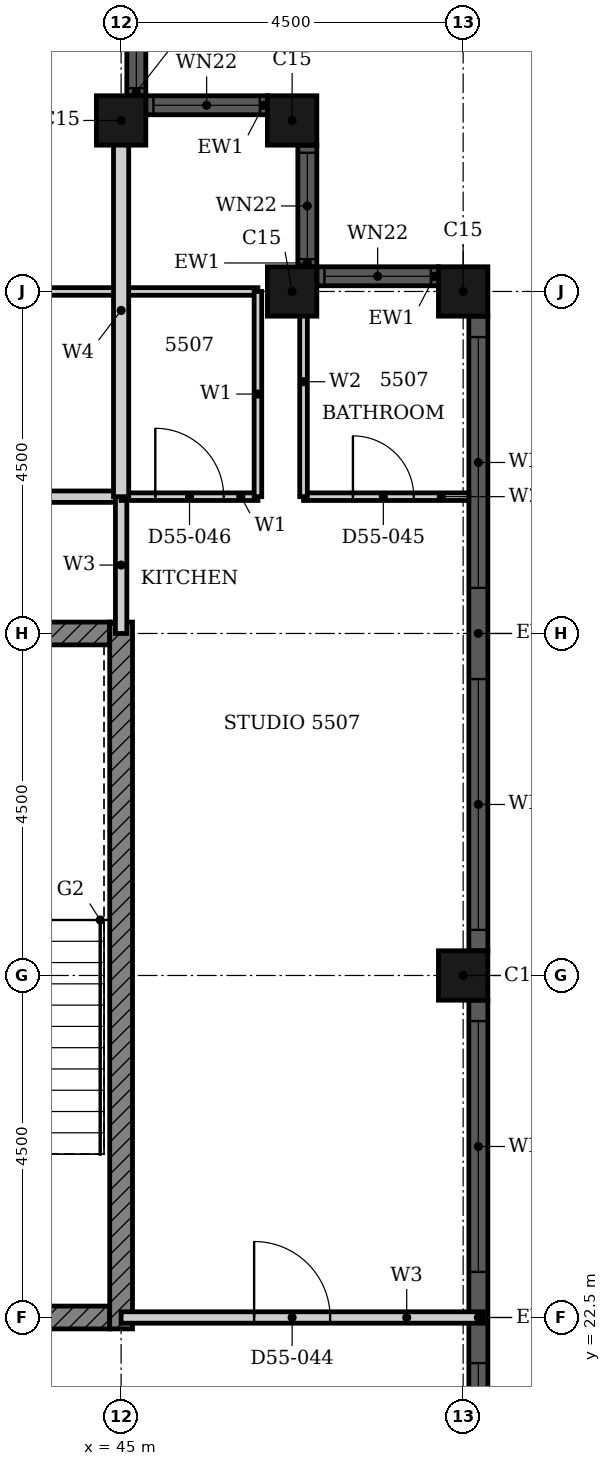
"""IFC4 building model, lengths in metres.
Left out: names, types, materials, properties, quantities, classifications, styles, units other than length and angle.
Written with IfcOpenShell. Run it as: python <this file> out.ifc"""

import sys

from ifc_helpers import new_model, si_unit, direction, frame, frame_2d, origin, origin_2d, place, context, subcontext, project, spatial, rectangle, hollow_rectangle, extrude, element, fill, save


model = new_model("IFC4")
c1 = context("Model", 3, precision=1e-05, world=origin(), true_north=direction((0.0, 1.0)))
c2 = subcontext(c1, "Body", "Model", "MODEL_VIEW")
j1 = project(units=[si_unit("LENGTHUNIT", "METRE"), si_unit("PLANEANGLEUNIT", "RADIAN")], contexts=[c1])
p1 = place(None, origin())
s1 = spatial("IfcSite", under=j1, at=p1, CompositionType="ELEMENT")
p2 = place(p1, origin())
s2 = spatial("IfcBuilding", under=s1, at=p2, CompositionType="ELEMENT")
p3 = place(p2, frame((0.0, 0.0, 218.3)))
s3 = spatial("IfcBuildingStorey", under=s2, at=p3, CompositionType="ELEMENT", Elevation=218.3)
for number, where, z_axis, x_axis in (
    (1, (49.5, 27.0, 0.0), (0.0, 0.0, 1.0), (1.0, 0.0, 0.0)),
    (2, (49.5, 36.0, 0.0), (0.0, 0.0, 1.0), (1.0, 0.0, 0.0)),
    (3, (47.25, 36.0, 0.0), (0.0, 0.0, 1.0), (1.0, 0.0, 0.0)),
    (4, (47.25, 38.25, 0.0), (0.0, 0.0, 1.0), (1.0, 0.0, 0.0)),
    (5, (45.0, 38.25, 0.0), (0.0, 0.0, 1.0), (1.0, 0.0, 0.0)),
):
    element("IfcColumn", number, at=place(p3, frame(where, z_axis=z_axis, x_axis=x_axis)), inside=s3, PredefinedType="COLUMN", context=c2, shape_type="SweptSolid", body=[
        extrude(hollow_rectangle(XDim=0.65, YDim=0.65, WallThickness=0.021, at=origin_2d()), origin(), (0.0, 0.0, 1.0), 3.7),
    ])
p4 = place(p3, frame((49.7, 18.325, 0.0), z_axis=(0.0, 0.0, 1.0), x_axis=(0.0, 1.0, 0.0)))
e6 = element("IfcWall", 6, at=p4, inside=s3, PredefinedType="SOLIDWALL", context=c2, shape_type="SweptSolid", body=[
    extrude(rectangle(XDim=8.35, YDim=0.25, at=frame_2d((4.175, 0.0))), origin(), (0.0, 0.0, 1.0), 3.7),
])
p5 = place(p4, frame((0.275, 0.0, 0.45)))
e7 = element("IfcOpeningElement", 7, at=p5, cuts=e6, PredefinedType="OPENING", context=c2, shape_type="SweptSolid", body=[
    extrude(rectangle(XDim=3.3, YDim=2.3, at=frame_2d((1.65, 1.15))), frame((0.0, 0.135, 0.0), z_axis=(0.0, -1.0, 0.0), x_axis=(1.0, 0.0, 0.0)), (0.0, 0.0, 1.0), 0.27),
])
p6 = place(p4, frame((4.775, 0.0, 0.45)))
e8 = element("IfcOpeningElement", 8, at=p6, cuts=e6, PredefinedType="OPENING", context=c2, shape_type="SweptSolid", body=[
    extrude(rectangle(XDim=3.3, YDim=2.3, at=frame_2d((1.65, 1.15))), frame((0.0, 0.135, 0.0), z_axis=(0.0, -1.0, 0.0), x_axis=(1.0, 0.0, 0.0)), (0.0, 0.0, 1.0), 0.27),
])
p7 = place(p3, frame((49.7, 27.325, 0.0), z_axis=(0.0, 0.0, 1.0), x_axis=(0.0, 1.0, 0.0)))
e9 = element("IfcWall", 9, at=p7, inside=s3, PredefinedType="SOLIDWALL", context=c2, shape_type="SweptSolid", body=[
    extrude(rectangle(XDim=8.35, YDim=0.25, at=frame_2d((4.175, 0.0))), origin(), (0.0, 0.0, 1.0), 3.7),
])
p8 = place(p7, frame((0.275, 0.0, 0.45)))
e10 = element("IfcOpeningElement", 10, at=p8, cuts=e9, PredefinedType="OPENING", context=c2, shape_type="SweptSolid", body=[
    extrude(rectangle(XDim=3.3, YDim=2.3, at=frame_2d((1.65, 1.15))), frame((0.0, 0.135, 0.0), z_axis=(0.0, -1.0, 0.0), x_axis=(1.0, 0.0, 0.0)), (0.0, 0.0, 1.0), 0.27),
])
p9 = place(p7, frame((4.775, 0.0, 0.45)))
e11 = element("IfcOpeningElement", 11, at=p9, cuts=e9, PredefinedType="OPENING", context=c2, shape_type="SweptSolid", body=[
    extrude(rectangle(XDim=3.3, YDim=2.3, at=frame_2d((1.65, 1.15))), frame((0.0, 0.135, 0.0), z_axis=(0.0, -1.0, 0.0), x_axis=(1.0, 0.0, 0.0)), (0.0, 0.0, 1.0), 0.27),
])
p10 = place(p3, frame((49.175, 36.2, 0.0), z_axis=(0.0, 0.0, 1.0), x_axis=(-1.0, 0.0, 0.0)))
e12 = element("IfcWall", 12, at=p10, inside=s3, PredefinedType="SOLIDWALL", context=c2, shape_type="SweptSolid", body=[
    extrude(rectangle(XDim=1.6, YDim=0.25, at=frame_2d((0.8, 0.0))), origin(), (0.0, 0.0, 1.0), 3.7),
])
p11 = place(p10, frame((0.1, 0.0, 0.9)))
e13 = element("IfcOpeningElement", 13, at=p11, cuts=e12, PredefinedType="OPENING", context=c2, shape_type="SweptSolid", body=[
    extrude(rectangle(XDim=1.4, YDim=1.85, at=frame_2d((0.7, 0.925))), frame((0.0, 0.135, 0.0), z_axis=(0.0, -1.0, 0.0), x_axis=(1.0, 0.0, 0.0)), (0.0, 0.0, 1.0), 0.27),
])
p12 = place(p3, frame((47.45, 36.325, 0.0), z_axis=(0.0, 0.0, 1.0), x_axis=(0.0, 1.0, 0.0)))
e14 = element("IfcWall", 14, at=p12, inside=s3, PredefinedType="SOLIDWALL", context=c2, shape_type="SweptSolid", body=[
    extrude(rectangle(XDim=1.6, YDim=0.25, at=frame_2d((0.8, 0.0))), origin(), (0.0, 0.0, 1.0), 3.7),
])
p13 = place(p12, frame((0.1, 0.0, 0.9)))
e15 = element("IfcOpeningElement", 15, at=p13, cuts=e14, PredefinedType="OPENING", context=c2, shape_type="SweptSolid", body=[
    extrude(rectangle(XDim=1.4, YDim=1.85, at=frame_2d((0.7, 0.925))), frame((0.0, 0.135, 0.0), z_axis=(0.0, -1.0, 0.0), x_axis=(1.0, 0.0, 0.0)), (0.0, 0.0, 1.0), 0.27),
])
p14 = place(p3, frame((46.925, 38.45, 0.0), z_axis=(0.0, 0.0, 1.0), x_axis=(-1.0, 0.0, 0.0)))
e16 = element("IfcWall", 16, at=p14, inside=s3, PredefinedType="SOLIDWALL", context=c2, shape_type="SweptSolid", body=[
    extrude(rectangle(XDim=1.6, YDim=0.25, at=frame_2d((0.8, 0.0))), origin(), (0.0, 0.0, 1.0), 3.7),
])
p15 = place(p14, frame((0.1, 0.0, 0.9)))
e17 = element("IfcOpeningElement", 17, at=p15, cuts=e16, PredefinedType="OPENING", context=c2, shape_type="SweptSolid", body=[
    extrude(rectangle(XDim=1.4, YDim=1.85, at=frame_2d((0.7, 0.925))), frame((0.0, 0.135, 0.0), z_axis=(0.0, -1.0, 0.0), x_axis=(1.0, 0.0, 0.0)), (0.0, 0.0, 1.0), 0.27),
])
p16 = place(p3, frame((45.2, 38.575, 0.0), z_axis=(0.0, 0.0, 1.0), x_axis=(0.0, 1.0, 0.0)))
e18 = element("IfcWall", 18, at=p16, inside=s3, PredefinedType="SOLIDWALL", context=c2, shape_type="SweptSolid", body=[
    extrude(rectangle(XDim=1.6, YDim=0.25, at=frame_2d((0.8, 0.0))), origin(), (0.0, 0.0, 1.0), 3.7),
])
p17 = place(p16, frame((0.1, 0.0, 0.9)))
e19 = element("IfcOpeningElement", 19, at=p17, cuts=e18, PredefinedType="OPENING", context=c2, shape_type="SweptSolid", body=[
    extrude(rectangle(XDim=1.4, YDim=1.85, at=frame_2d((0.7, 0.925))), frame((0.0, 0.135, 0.0), z_axis=(0.0, -1.0, 0.0), x_axis=(1.0, 0.0, 0.0)), (0.0, 0.0, 1.0), 0.27),
])
p18 = place(p3, frame((32.911, 22.5, 0.0), z_axis=(0.0, 0.0, 1.0), x_axis=(1.0, 0.0, 0.0)))
e20 = element("IfcWall", 20, at=p18, inside=s3, PredefinedType="SHEAR", context=c2, shape_type="SweptSolid", body=[
    extrude(rectangle(XDim=11.939, YDim=0.3, at=frame_2d((5.97, 0.0))), origin(), (0.0, 0.0, 1.0), 3.4),
])
p19 = place(p18, frame((5.404, 0.0, 0.0)))
e21 = element("IfcOpeningElement", 21, at=p19, cuts=e20, PredefinedType="OPENING", context=c2, shape_type="SweptSolid", body=[
    extrude(rectangle(XDim=1.8, YDim=2.1, at=frame_2d((0.9, 1.05))), frame((0.0, 0.16, 0.0), z_axis=(0.0, -1.0, 0.0), x_axis=(1.0, 0.0, 0.0)), (0.0, 0.0, 1.0), 0.32),
])
p20 = place(p3, frame((40.625, 31.5, 0.0), z_axis=(0.0, 0.0, 1.0), x_axis=(1.0, 0.0, 0.0)))
e22 = element("IfcWall", 22, at=p20, inside=s3, PredefinedType="SHEAR", context=c2, shape_type="SweptSolid", body=[
    extrude(rectangle(XDim=4.225, YDim=0.3, at=frame_2d((2.113, 0.0))), origin(), (0.0, 0.0, 1.0), 3.4),
])
p21 = place(p3, frame((45.0, 22.35, 0.0), z_axis=(0.0, 0.0, 1.0), x_axis=(0.0, 1.0, 0.0)))
e23 = element("IfcWall", 23, at=p21, inside=s3, PredefinedType="SHEAR", context=c2, shape_type="SweptSolid", body=[
    extrude(rectangle(XDim=9.3, YDim=0.3, at=frame_2d((4.65, 0.0))), origin(), (0.0, 0.0, 1.0), 3.4),
])
p22 = place(p3, frame((45.0, 22.5, 0.0), z_axis=(0.0, 0.0, 1.0), x_axis=(1.0, 0.0, 0.0)))
e24 = element("IfcWall", 24, at=p22, inside=s3, PredefinedType="PARTITIONING", context=c2, shape_type="SweptSolid", body=[
    extrude(rectangle(XDim=4.765, YDim=0.15, at=frame_2d((2.382, 0.0))), origin(), (0.0, 0.0, 1.0), 3.4),
])
p23 = place(p22, frame((1.75, 0.0, 0.0)))
e25 = element("IfcOpeningElement", 25, at=p23, cuts=e24, PredefinedType="OPENING", context=c2, shape_type="SweptSolid", body=[
    extrude(rectangle(XDim=1.0, YDim=2.2, at=frame_2d((0.5, 1.1))), frame((0.0, 0.085, 0.0), z_axis=(0.0, -1.0, 0.0), x_axis=(1.0, 0.0, 0.0)), (0.0, 0.0, 1.0), 0.17),
])
p24 = place(p3, frame((33.9, 33.3, 0.0), z_axis=(0.0, 0.0, 1.0), x_axis=(1.0, 0.0, 0.0)))
e26 = element("IfcWall", 26, at=p24, inside=s3, PredefinedType="PARTITIONING", context=c2, shape_type="SweptSolid", body=[
    extrude(rectangle(XDim=11.1, YDim=0.15, at=frame_2d((5.55, 0.0))), origin(), (0.0, 0.0, 1.0), 3.4),
])
p25 = place(p24, frame((1.6, 0.0, 0.0)))
e27 = element("IfcOpeningElement", 27, at=p25, cuts=e26, PredefinedType="OPENING", context=c2, shape_type="SweptSolid", body=[
    extrude(rectangle(XDim=1.0, YDim=2.2, at=frame_2d((0.5, 1.1))), frame((0.0, 0.085, 0.0), z_axis=(0.0, -1.0, 0.0), x_axis=(1.0, 0.0, 0.0)), (0.0, 0.0, 1.0), 0.17),
])
p26 = place(p3, frame((45.0, 31.5, 0.0), z_axis=(0.0, 0.0, 1.0), x_axis=(0.0, 1.0, 0.0)))
e28 = element("IfcWall", 28, at=p26, inside=s3, PredefinedType="PARTITIONING", context=c2, shape_type="SweptSolid", body=[
    extrude(rectangle(XDim=1.8, YDim=0.15, at=frame_2d((0.9, 0.0))), origin(), (0.0, 0.0, 1.0), 3.4),
])
p27 = place(p3, frame((45.0, 33.3, 0.0), z_axis=(0.0, 0.0, 1.0), x_axis=(1.0, 0.0, 0.0)))
e29 = element("IfcWall", 29, at=p27, inside=s3, PredefinedType="PARTITIONING", context=c2, shape_type="SweptSolid", body=[
    extrude(rectangle(XDim=1.8, YDim=0.1, at=frame_2d((0.9, 0.0))), origin(), (0.0, 0.0, 1.0), 3.4),
])
p28 = place(p27, frame((0.45, 0.0, 0.0)))
e30 = element("IfcOpeningElement", 30, at=p28, cuts=e29, PredefinedType="OPENING", context=c2, shape_type="SweptSolid", body=[
    extrude(rectangle(XDim=0.9, YDim=2.1, at=frame_2d((0.45, 1.05))), frame((0.0, 0.06, 0.0), z_axis=(0.0, -1.0, 0.0), x_axis=(1.0, 0.0, 0.0)), (0.0, 0.0, 1.0), 0.12),
])
p29 = place(p3, frame((38.1, 36.0, 0.0), z_axis=(0.0, 0.0, 1.0), x_axis=(1.0, 0.0, 0.0)))
e31 = element("IfcWall", 31, at=p29, inside=s3, PredefinedType="PARTITIONING", context=c2, shape_type="SweptSolid", body=[
    extrude(rectangle(XDim=8.7, YDim=0.1, at=frame_2d((4.35, 0.0))), origin(), (0.0, 0.0, 1.0), 3.4),
])
p30 = place(p29, frame((4.65, 0.0, 0.0)))
e32 = element("IfcOpeningElement", 32, at=p30, cuts=e31, PredefinedType="OPENING", context=c2, shape_type="SweptSolid", body=[
    extrude(rectangle(XDim=0.9, YDim=2.1, at=frame_2d((0.45, 1.05))), frame((0.0, 0.06, 0.0), z_axis=(0.0, -1.0, 0.0), x_axis=(1.0, 0.0, 0.0)), (0.0, 0.0, 1.0), 0.12),
])
p31 = place(p3, frame((46.8, 33.3, 0.0), z_axis=(0.0, 0.0, 1.0), x_axis=(0.0, 1.0, 0.0)))
e33 = element("IfcWall", 33, at=p31, inside=s3, PredefinedType="PARTITIONING", context=c2, shape_type="SweptSolid", body=[
    extrude(rectangle(XDim=2.7, YDim=0.1, at=frame_2d((1.35, 0.0))), origin(), (0.0, 0.0, 1.0), 3.4),
])
p32 = place(p3, frame((45.0, 33.3, 0.0), z_axis=(0.0, 0.0, 1.0), x_axis=(0.0, 1.0, 0.0)))
e34 = element("IfcWall", 34, at=p32, inside=s3, PredefinedType="PARTITIONING", context=c2, shape_type="SweptSolid", body=[
    extrude(rectangle(XDim=4.9, YDim=0.2, at=frame_2d((2.45, 0.0))), origin(), (0.0, 0.0, 1.0), 3.4),
])
p33 = place(p3, frame((47.4, 33.3, 0.0), z_axis=(0.0, 0.0, 1.0), x_axis=(1.0, 0.0, 0.0)))
e35 = element("IfcWall", 35, at=p33, inside=s3, PredefinedType="PARTITIONING", context=c2, shape_type="SweptSolid", body=[
    extrude(rectangle(XDim=2.175, YDim=0.1, at=frame_2d((1.087, 0.0))), origin(), (0.0, 0.0, 1.0), 3.4),
])
p34 = place(p33, frame((0.65, 0.0, 0.0)))
e36 = element("IfcOpeningElement", 36, at=p34, cuts=e35, PredefinedType="OPENING", context=c2, shape_type="SweptSolid", body=[
    extrude(rectangle(XDim=0.8, YDim=2.1, at=frame_2d((0.4, 1.05))), frame((0.0, 0.06, 0.0), z_axis=(0.0, -1.0, 0.0), x_axis=(1.0, 0.0, 0.0)), (0.0, 0.0, 1.0), 0.12),
])
p35 = place(p3, frame((47.4, 33.3, 0.0), z_axis=(0.0, 0.0, 1.0), x_axis=(0.0, 1.0, 0.0)))
e37 = element("IfcWall", 37, at=p35, inside=s3, PredefinedType="PARTITIONING", context=c2, shape_type="SweptSolid", body=[
    extrude(rectangle(XDim=3.025, YDim=0.1, at=frame_2d((1.512, 0.0))), origin(), (0.0, 0.0, 1.0), 3.4),
])
p36 = place(p5, origin())
e38 = element("IfcWindow", 38, at=p36, inside=s3, PartitioningType="SINGLE_PANEL", PredefinedType="WINDOW", context=c2, shape_type="SweptSolid", body=[
    extrude(rectangle(XDim=3.3, YDim=2.3, at=frame_2d((1.65, 1.15))), frame((0.0, 0.03, 0.0), z_axis=(0.0, -1.0, 0.0), x_axis=(1.0, 0.0, 0.0)), (0.0, 0.0, 1.0), 0.06),
])
fill(e7, e38)
p37 = place(p6, origin())
e39 = element("IfcWindow", 39, at=p37, inside=s3, PartitioningType="SINGLE_PANEL", PredefinedType="WINDOW", context=c2, shape_type="SweptSolid", body=[
    extrude(rectangle(XDim=3.3, YDim=2.3, at=frame_2d((1.65, 1.15))), frame((0.0, 0.03, 0.0), z_axis=(0.0, -1.0, 0.0), x_axis=(1.0, 0.0, 0.0)), (0.0, 0.0, 1.0), 0.06),
])
fill(e8, e39)
p38 = place(p8, origin())
e40 = element("IfcWindow", 40, at=p38, inside=s3, PartitioningType="SINGLE_PANEL", PredefinedType="WINDOW", context=c2, shape_type="SweptSolid", body=[
    extrude(rectangle(XDim=3.3, YDim=2.3, at=frame_2d((1.65, 1.15))), frame((0.0, 0.03, 0.0), z_axis=(0.0, -1.0, 0.0), x_axis=(1.0, 0.0, 0.0)), (0.0, 0.0, 1.0), 0.06),
])
fill(e10, e40)
p39 = place(p9, origin())
e41 = element("IfcWindow", 41, at=p39, inside=s3, PartitioningType="SINGLE_PANEL", PredefinedType="WINDOW", context=c2, shape_type="SweptSolid", body=[
    extrude(rectangle(XDim=3.3, YDim=2.3, at=frame_2d((1.65, 1.15))), frame((0.0, 0.03, 0.0), z_axis=(0.0, -1.0, 0.0), x_axis=(1.0, 0.0, 0.0)), (0.0, 0.0, 1.0), 0.06),
])
fill(e11, e41)
p40 = place(p11, origin())
e42 = element("IfcWindow", 42, at=p40, inside=s3, PartitioningType="SINGLE_PANEL", PredefinedType="WINDOW", context=c2, shape_type="SweptSolid", body=[
    extrude(rectangle(XDim=1.4, YDim=1.85, at=frame_2d((0.7, 0.925))), frame((0.0, 0.03, 0.0), z_axis=(0.0, -1.0, 0.0), x_axis=(1.0, 0.0, 0.0)), (0.0, 0.0, 1.0), 0.06),
])
fill(e13, e42)
p41 = place(p13, origin())
e43 = element("IfcWindow", 43, at=p41, inside=s3, PartitioningType="SINGLE_PANEL", PredefinedType="WINDOW", context=c2, shape_type="SweptSolid", body=[
    extrude(rectangle(XDim=1.4, YDim=1.85, at=frame_2d((0.7, 0.925))), frame((0.0, 0.03, 0.0), z_axis=(0.0, -1.0, 0.0), x_axis=(1.0, 0.0, 0.0)), (0.0, 0.0, 1.0), 0.06),
])
fill(e15, e43)
p42 = place(p15, origin())
e44 = element("IfcWindow", 44, at=p42, inside=s3, PartitioningType="SINGLE_PANEL", PredefinedType="WINDOW", context=c2, shape_type="SweptSolid", body=[
    extrude(rectangle(XDim=1.4, YDim=1.85, at=frame_2d((0.7, 0.925))), frame((0.0, 0.03, 0.0), z_axis=(0.0, -1.0, 0.0), x_axis=(1.0, 0.0, 0.0)), (0.0, 0.0, 1.0), 0.06),
])
fill(e17, e44)
p43 = place(p17, origin())
e45 = element("IfcWindow", 45, at=p43, inside=s3, PartitioningType="SINGLE_PANEL", PredefinedType="WINDOW", context=c2, shape_type="SweptSolid", body=[
    extrude(rectangle(XDim=1.4, YDim=1.85, at=frame_2d((0.7, 0.925))), frame((0.0, 0.03, 0.0), z_axis=(0.0, -1.0, 0.0), x_axis=(1.0, 0.0, 0.0)), (0.0, 0.0, 1.0), 0.06),
])
fill(e19, e45)
p44 = place(p23, origin())
e46 = element("IfcDoor", 46, at=p44, inside=s3, OperationType="SINGLE_SWING_LEFT", PredefinedType="DOOR", context=c2, shape_type="SweptSolid", body=[
    extrude(rectangle(XDim=1.0, YDim=2.2, at=frame_2d((0.5, 1.1))), frame((0.0, 0.025, 0.0), z_axis=(0.0, -1.0, 0.0), x_axis=(1.0, 0.0, 0.0)), (0.0, 0.0, 1.0), 0.05),
])
fill(e25, e46)
p45 = place(p34, origin())
e47 = element("IfcDoor", 47, at=p45, inside=s3, OperationType="SINGLE_SWING_LEFT", PredefinedType="DOOR", context=c2, shape_type="SweptSolid", body=[
    extrude(rectangle(XDim=0.8, YDim=2.1, at=frame_2d((0.4, 1.05))), frame((0.0, 0.025, 0.0), z_axis=(0.0, -1.0, 0.0), x_axis=(1.0, 0.0, 0.0)), (0.0, 0.0, 1.0), 0.05),
])
fill(e36, e47)
p46 = place(p28, origin())
e48 = element("IfcDoor", 48, at=p46, inside=s3, OperationType="SINGLE_SWING_RIGHT", PredefinedType="DOOR", context=c2, shape_type="SweptSolid", body=[
    extrude(rectangle(XDim=0.9, YDim=2.1, at=frame_2d((0.45, 1.05))), frame((0.0, 0.025, 0.0), z_axis=(0.0, -1.0, 0.0), x_axis=(1.0, 0.0, 0.0)), (0.0, 0.0, 1.0), 0.05),
])
fill(e30, e48)
save(model, sys.argv[1])
